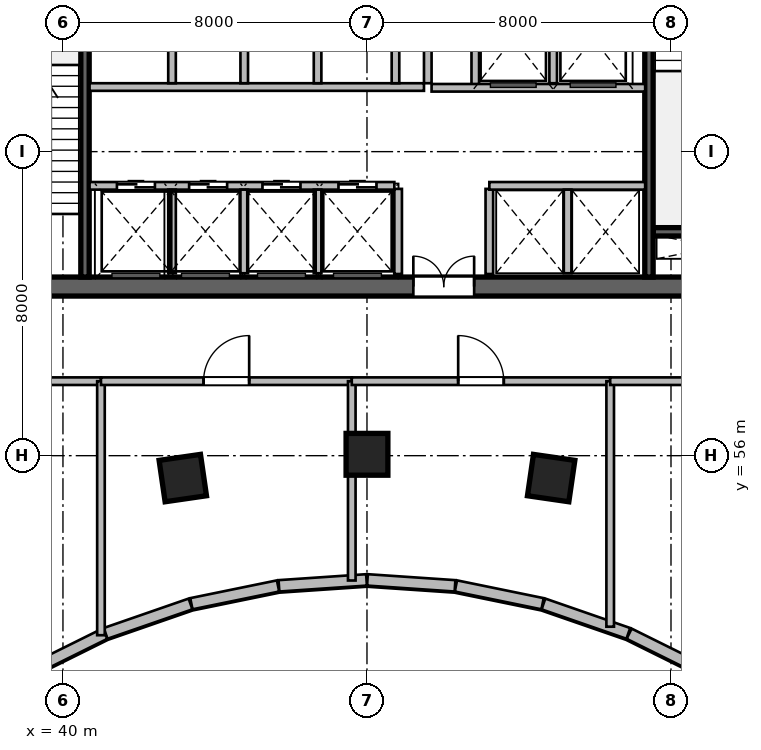
"""IFC4 building model, lengths in metres.
Left out: names, types, materials, properties, quantities, classifications, styles, units other than length and angle.
Written with IfcOpenShell. Run it as: python <this file> out.ifc"""

import sys

from ifc_helpers import new_model, si_unit, direction, frame, frame_2d, origin, origin_2d, place, context, subcontext, project, spatial, rectangle, extrude, source, transform, mapped, element, fill, save


model = new_model("IFC4")
c1 = context("Model", 3, precision=1e-05, world=origin(), true_north=direction((0.0, 1.0)))
c2 = subcontext(c1, "Body", "Model", "MODEL_VIEW")
j1 = project(units=[si_unit("LENGTHUNIT", "METRE"), si_unit("PLANEANGLEUNIT", "RADIAN")], contexts=[c1])
p1 = place(None, origin())
s1 = spatial("IfcSite", under=j1, at=p1, CompositionType="ELEMENT")
p2 = place(p1, origin())
s2 = spatial("IfcBuilding", under=s1, at=p2, CompositionType="ELEMENT")
p3 = place(p2, frame((0.0, 0.0, 85.8)))
s3 = spatial("IfcBuildingStorey", under=s2, at=p3, CompositionType="ELEMENT", Elevation=85.8)
m1 = source(origin(), c2, "Body", "SweptSolid", [
    extrude(rectangle(XDim=21.6, YDim=0.5, at=frame_2d((10.8, 0.0))), origin(), (0.0, 0.0, 1.0), 5.4),
])
p4 = place(p3, frame((37.2, 60.45, 0.0), z_axis=(0.0, 0.0, 1.0), x_axis=(1.0, 0.0, 0.0)))
e1 = element("IfcWall", 1, at=p4, inside=s3, PredefinedType="SHEAR", context=c2, shape_type="MappedRepresentation", body=[
    mapped(m1, transform((0.0, 0.0, 0.0), scale=1.0)),
])
p5 = place(p4, frame((1.1, 0.0, 0.0)))
e2 = element("IfcOpeningElement", 2, at=p5, cuts=e1, PredefinedType="OPENING", context=c2, shape_type="SweptSolid", body=[
    extrude(rectangle(XDim=1.15, YDim=2.15, at=frame_2d((0.575, 1.075))), frame((0.0, 0.26, 0.0), z_axis=(0.0, -1.0, 0.0), x_axis=(1.0, 0.0, 0.0)), (0.0, 0.0, 1.0), 0.52),
])
p6 = place(p4, frame((19.5, 0.0, 0.0)))
e3 = element("IfcOpeningElement", 3, at=p6, cuts=e1, PredefinedType="OPENING", context=c2, shape_type="SweptSolid", body=[
    extrude(rectangle(XDim=0.9, YDim=2.1, at=frame_2d((0.45, 1.05))), frame((0.0, 0.26, 0.0), z_axis=(0.0, -1.0, 0.0), x_axis=(1.0, 0.0, 0.0)), (0.0, 0.0, 1.0), 0.52),
])
p7 = place(p4, frame((12.02, 0.0, 0.0)))
e4 = element("IfcOpeningElement", 4, at=p7, cuts=e1, PredefinedType="OPENING", context=c2, shape_type="SweptSolid", body=[
    extrude(rectangle(XDim=1.6, YDim=2.15, at=frame_2d((0.8, 1.075))), frame((0.0, 0.26, 0.0), z_axis=(0.0, -1.0, 0.0), x_axis=(1.0, 0.0, 0.0)), (0.0, 0.0, 1.0), 0.52),
])
m2 = source(origin(), c2, "Body", "SweptSolid", [
    extrude(rectangle(XDim=3.27, YDim=0.22, at=frame_2d((1.635, 0.0))), origin(), (0.0, 0.0, 1.0), 5.4),
])
p8 = place(p3, frame((55.53, 61.89, 0.0), z_axis=(0.0, 0.0, 1.0), x_axis=(1.0, 0.0, 0.0)))
e5 = element("IfcWall", 5, at=p8, inside=s3, PredefinedType="SHEAR", context=c2, shape_type="MappedRepresentation", body=[
    mapped(m2, transform((0.0, 0.0, 0.0), scale=1.0)),
])
m3 = source(origin(), c2, "Body", "SweptSolid", [
    extrude(rectangle(XDim=11.0, YDim=0.22, at=frame_2d((5.5, 0.0))), origin(), (0.0, 0.0, 1.0), 5.4),
])
p9 = place(p3, frame((40.58, 60.7, 0.0), z_axis=(0.0, 0.0, 1.0), x_axis=(0.0, 1.0, 0.0)))
e6 = element("IfcWall", 6, at=p9, inside=s3, PredefinedType="SHEAR", context=c2, shape_type="MappedRepresentation", body=[
    mapped(m3, transform((0.0, 0.0, 0.0), scale=1.0)),
])
p10 = place(p3, frame((55.42, 60.7, 0.0), z_axis=(0.0, 0.0, 1.0), x_axis=(0.0, 1.0, 0.0)))
e7 = element("IfcWall", 7, at=p10, inside=s3, PredefinedType="SHEAR", context=c2, shape_type="MappedRepresentation", body=[
    mapped(m3, transform((0.0, 0.0, 0.0), scale=1.0)),
])
p11 = place(p10, frame((9.545, 0.0, 0.0)))
e8 = element("IfcOpeningElement", 8, at=p11, cuts=e7, PredefinedType="OPENING", context=c2, shape_type="SweptSolid", body=[
    extrude(rectangle(XDim=1.15, YDim=2.15, at=frame_2d((0.575, 1.075))), frame((0.0, 0.12, 0.0), z_axis=(0.0, -1.0, 0.0), x_axis=(1.0, 0.0, 0.0)), (0.0, 0.0, 1.0), 0.24),
])
m4 = source(origin(), c2, "Body", "SweptSolid", [
    extrude(rectangle(XDim=1.1, YDim=1.1, at=origin_2d()), origin(), (0.0, 0.0, 1.0), 5.4),
])
for number, where, z_axis, x_axis in (
    (9, (43.154, 55.411, 0.0), (0.0, 0.0, 1.0), (-0.143, 0.99, 0.0)),
    (10, (48.0, 56.036, 0.0), (0.0, 0.0, 1.0), (0.0, 1.0, 0.0)),
    (11, (52.846, 55.411, 0.0), (0.0, 0.0, 1.0), (0.143, 0.99, 0.0)),
):
    element("IfcColumn", number, at=place(p3, frame(where, z_axis=z_axis, x_axis=x_axis)), inside=s3, PredefinedType="COLUMN", context=c2, shape_type="MappedRepresentation", body=[
        mapped(m4, transform((0.0, 0.0, 0.0), scale=1.0)),
    ])
m5 = source(origin(), c2, "Body", "SweptSolid", [
    extrude(rectangle(XDim=2.415, YDim=0.3, at=frame_2d((1.208, 0.0))), origin(), (0.0, 0.0, 1.0), 5.15),
])
p12 = place(p3, frame((57.062, 50.243, 0.0), z_axis=(0.0, 0.0, 1.0), x_axis=(-0.895978588606, 0.444097251466, 0.0)))
e12 = element("IfcWall", 12, at=p12, inside=s3, PredefinedType="SOLIDWALL", context=c2, shape_type="MappedRepresentation", body=[
    mapped(m5, transform((0.0, 0.0, 0.0), scale=1.0)),
])
m6 = source(origin(), c2, "Body", "SweptSolid", [
    extrude(rectangle(XDim=2.364, YDim=0.3, at=frame_2d((1.182, 0.0))), origin(), (0.0, 0.0, 1.0), 5.15),
])
p13 = place(p3, frame((54.877, 51.324, 0.0), z_axis=(0.0, 0.0, 1.0), x_axis=(-0.944877958415, 0.327422729359, 0.0)))
e13 = element("IfcWall", 13, at=p13, inside=s3, PredefinedType="SOLIDWALL", context=c2, shape_type="MappedRepresentation", body=[
    mapped(m6, transform((0.0, 0.0, 0.0), scale=1.0)),
])
m7 = source(origin(), c2, "Body", "SweptSolid", [
    extrude(rectangle(XDim=2.328, YDim=0.3, at=frame_2d((1.164, 0.0))), origin(), (0.0, 0.0, 1.0), 5.15),
])
p14 = place(p3, frame((52.621, 52.104, 0.0), z_axis=(0.0, 0.0, 1.0), x_axis=(-0.979604817867, 0.200933821971, 0.0)))
e14 = element("IfcWall", 14, at=p14, inside=s3, PredefinedType="SOLIDWALL", context=c2, shape_type="MappedRepresentation", body=[
    mapped(m7, transform((0.0, 0.0, 0.0), scale=1.0)),
])
m8 = source(origin(), c2, "Body", "SweptSolid", [
    extrude(rectangle(XDim=2.31, YDim=0.3, at=frame_2d((1.155, 0.0))), origin(), (0.0, 0.0, 1.0), 5.15),
])
for number, where, z_axis, x_axis in (
    (15, (50.316, 52.575, 0.0), (0.0, 0.0, 1.0), (-0.998, 0.068, 0.0)),
    (16, (47.988, 52.732, 0.0), (0.0, 0.0, 1.0), (-0.998, -0.068, 0.0)),
):
    element("IfcWall", number, at=place(p3, frame(where, z_axis=z_axis, x_axis=x_axis)), inside=s3, PredefinedType="SOLIDWALL", context=c2, shape_type="MappedRepresentation", body=[
        mapped(m8, transform((0.0, 0.0, 0.0), scale=1.0)),
    ])
p15 = place(p3, frame((45.66, 52.572, 0.0), z_axis=(0.0, 0.0, 1.0), x_axis=(-0.979604817867, -0.200933821971, 0.0)))
e17 = element("IfcWall", 17, at=p15, inside=s3, PredefinedType="SOLIDWALL", context=c2, shape_type="MappedRepresentation", body=[
    mapped(m7, transform((0.0, 0.0, 0.0), scale=1.0)),
])
p16 = place(p3, frame((43.356, 52.098, 0.0), z_axis=(0.0, 0.0, 1.0), x_axis=(-0.944877958415, -0.327422729359, 0.0)))
e18 = element("IfcWall", 18, at=p16, inside=s3, PredefinedType="SOLIDWALL", context=c2, shape_type="MappedRepresentation", body=[
    mapped(m6, transform((0.0, 0.0, 0.0), scale=1.0)),
])
p17 = place(p3, frame((41.102, 51.315, 0.0), z_axis=(0.0, 0.0, 1.0), x_axis=(-0.895978588606, -0.444097251466, 0.0)))
e19 = element("IfcWall", 19, at=p17, inside=s3, PredefinedType="SOLIDWALL", context=c2, shape_type="MappedRepresentation", body=[
    mapped(m5, transform((0.0, 0.0, 0.0), scale=1.0)),
])
m9 = source(origin(), c2, "Body", "SweptSolid", [
    extrude(rectangle(XDim=2.24, YDim=0.2, at=frame_2d((1.12, 0.0))), origin(), (0.0, 0.0, 1.0), 5.15),
])
for number, where, z_axis, x_axis in (
    (20, (48.82, 60.78, 0.0), (0.0, 0.0, 1.0), (0.0, 1.0, 0.0)),
    (21, (51.22, 60.78, 0.0), (0.0, 0.0, 1.0), (0.0, 1.0, 0.0)),
):
    element("IfcWall", number, at=place(p3, frame(where, z_axis=z_axis, x_axis=x_axis)), inside=s3, PredefinedType="SOLIDWALL", context=c2, shape_type="MappedRepresentation", body=[
        mapped(m9, transform((0.0, 0.0, 0.0), scale=1.0)),
    ])
m10 = source(origin(), c2, "Body", "SweptSolid", [
    extrude(rectangle(XDim=5.8, YDim=0.2, at=frame_2d((2.9, 0.0))), origin(), (0.0, 0.0, 1.0), 5.15),
])
p18 = place(p3, frame((49.6, 65.8, 0.0), z_axis=(0.0, 0.0, 1.0), x_axis=(0.0, 1.0, 0.0)))
e22 = element("IfcWall", 22, at=p18, inside=s3, PredefinedType="SOLIDWALL", context=c2, shape_type="MappedRepresentation", body=[
    mapped(m10, transform((0.0, 0.0, 0.0), scale=1.0)),
])
m11 = source(origin(), c2, "Body", "SweptSolid", [
    extrude(rectangle(XDim=2.58, YDim=0.2, at=frame_2d((1.29, 0.0))), origin(), (0.0, 0.0, 1.0), 5.15),
])
p19 = place(p3, frame((50.85, 65.68, 0.0), z_axis=(0.0, 0.0, 1.0), x_axis=(0.0, 1.0, 0.0)))
e23 = element("IfcWall", 23, at=p19, inside=s3, PredefinedType="SOLIDWALL", context=c2, shape_type="MappedRepresentation", body=[
    mapped(m11, transform((0.0, 0.0, 0.0), scale=1.0)),
])
m12 = source(origin(), c2, "Body", "SweptSolid", [
    extrude(rectangle(XDim=2.4, YDim=0.2, at=frame_2d((1.2, 0.0))), origin(), (0.0, 0.0, 1.0), 5.15),
])
p20 = place(p3, frame((52.9, 65.8, 0.0), z_axis=(0.0, 0.0, 1.0), x_axis=(0.0, 1.0, 0.0)))
e24 = element("IfcWall", 24, at=p20, inside=s3, PredefinedType="SOLIDWALL", context=c2, shape_type="MappedRepresentation", body=[
    mapped(m12, transform((0.0, 0.0, 0.0), scale=1.0)),
])
m13 = source(origin(), c2, "Body", "SweptSolid", [
    extrude(rectangle(XDim=5.62, YDim=0.2, at=frame_2d((2.81, 0.0))), origin(), (0.0, 0.0, 1.0), 5.15),
])
p21 = place(p3, frame((49.7, 65.68, 0.0), z_axis=(0.0, 0.0, 1.0), x_axis=(1.0, 0.0, 0.0)))
e25 = element("IfcWall", 25, at=p21, inside=s3, PredefinedType="SOLIDWALL", context=c2, shape_type="MappedRepresentation", body=[
    mapped(m13, transform((0.0, 0.0, 0.0), scale=1.0)),
])
m14 = source(origin(), c2, "Body", "SweptSolid", [
    extrude(rectangle(XDim=8.02, YDim=0.2, at=frame_2d((4.01, 0.0))), origin(), (0.0, 0.0, 1.0), 5.15),
])
p22 = place(p3, frame((40.7, 63.1, 0.0), z_axis=(0.0, 0.0, 1.0), x_axis=(1.0, 0.0, 0.0)))
e26 = element("IfcWall", 26, at=p22, inside=s3, PredefinedType="SOLIDWALL", context=c2, shape_type="MappedRepresentation", body=[
    mapped(m14, transform((0.0, 0.0, 0.0), scale=1.0)),
])
p23 = place(p22, frame((0.72, 0.0, 0.0)))
e27 = element("IfcOpeningElement", 27, at=p23, cuts=e26, PredefinedType="OPENING", context=c2, shape_type="SweptSolid", body=[
    extrude(rectangle(XDim=1.0, YDim=2.15, at=frame_2d((0.5, 1.075))), frame((0.0, 0.11, 0.0), z_axis=(0.0, -1.0, 0.0), x_axis=(1.0, 0.0, 0.0)), (0.0, 0.0, 1.0), 0.22),
])
p24 = place(p22, frame((2.62, 0.0, 0.0)))
e28 = element("IfcOpeningElement", 28, at=p24, cuts=e26, PredefinedType="OPENING", context=c2, shape_type="SweptSolid", body=[
    extrude(rectangle(XDim=1.0, YDim=2.15, at=frame_2d((0.5, 1.075))), frame((0.0, 0.11, 0.0), z_axis=(0.0, -1.0, 0.0), x_axis=(1.0, 0.0, 0.0)), (0.0, 0.0, 1.0), 0.22),
])
p25 = place(p22, frame((4.55, 0.0, 0.0)))
e29 = element("IfcOpeningElement", 29, at=p25, cuts=e26, PredefinedType="OPENING", context=c2, shape_type="SweptSolid", body=[
    extrude(rectangle(XDim=1.0, YDim=2.15, at=frame_2d((0.5, 1.075))), frame((0.0, 0.11, 0.0), z_axis=(0.0, -1.0, 0.0), x_axis=(1.0, 0.0, 0.0)), (0.0, 0.0, 1.0), 0.22),
])
p26 = place(p22, frame((6.55, 0.0, 0.0)))
e30 = element("IfcOpeningElement", 30, at=p26, cuts=e26, PredefinedType="OPENING", context=c2, shape_type="SweptSolid", body=[
    extrude(rectangle(XDim=1.0, YDim=2.15, at=frame_2d((0.5, 1.075))), frame((0.0, 0.11, 0.0), z_axis=(0.0, -1.0, 0.0), x_axis=(1.0, 0.0, 0.0)), (0.0, 0.0, 1.0), 0.22),
])
m15 = source(origin(), c2, "Body", "SweptSolid", [
    extrude(rectangle(XDim=4.1, YDim=0.2, at=frame_2d((2.05, 0.0))), origin(), (0.0, 0.0, 1.0), 5.15),
])
p27 = place(p3, frame((51.22, 63.1, 0.0), z_axis=(0.0, 0.0, 1.0), x_axis=(1.0, 0.0, 0.0)))
e31 = element("IfcWall", 31, at=p27, inside=s3, PredefinedType="SOLIDWALL", context=c2, shape_type="MappedRepresentation", body=[
    mapped(m15, transform((0.0, 0.0, 0.0), scale=1.0)),
])
m16 = source(origin(), c2, "Body", "SweptSolid", [
    extrude(rectangle(XDim=2.2, YDim=0.2, at=frame_2d((1.1, 0.0))), origin(), (0.0, 0.0, 1.0), 5.15),
])
for number, where, z_axis, x_axis in (
    (32, (42.87, 60.8, 0.0), (0.0, 0.0, 1.0), (0.0, 1.0, 0.0)),
    (33, (44.77, 60.8, 0.0), (0.0, 0.0, 1.0), (0.0, 1.0, 0.0)),
    (34, (46.7, 60.8, 0.0), (0.0, 0.0, 1.0), (0.0, 1.0, 0.0)),
    (35, (53.28, 60.8, 0.0), (0.0, 0.0, 1.0), (0.0, 1.0, 0.0)),
):
    element("IfcWall", number, at=place(p3, frame(where, z_axis=z_axis, x_axis=x_axis)), inside=s3, PredefinedType="SOLIDWALL", context=c2, shape_type="MappedRepresentation", body=[
        mapped(m16, transform((0.0, 0.0, 0.0), scale=1.0)),
    ])
m17 = source(origin(), c2, "Body", "SweptSolid", [
    extrude(rectangle(XDim=8.8, YDim=0.2, at=frame_2d((4.4, 0.0))), origin(), (0.0, 0.0, 1.0), 5.15),
])
p28 = place(p3, frame((40.7, 65.7, 0.0), z_axis=(0.0, 0.0, 1.0), x_axis=(1.0, 0.0, 0.0)))
e36 = element("IfcWall", 36, at=p28, inside=s3, PredefinedType="SOLIDWALL", context=c2, shape_type="MappedRepresentation", body=[
    mapped(m17, transform((0.0, 0.0, 0.0), scale=1.0)),
])
for number, where, z_axis, x_axis in (
    (37, (48.75, 65.8, 0.0), (0.0, 0.0, 1.0), (0.0, 1.0, 0.0)),
    (38, (42.87, 65.8, 0.0), (0.0, 0.0, 1.0), (0.0, 1.0, 0.0)),
    (39, (44.77, 65.8, 0.0), (0.0, 0.0, 1.0), (0.0, 1.0, 0.0)),
    (40, (46.7, 65.8, 0.0), (0.0, 0.0, 1.0), (0.0, 1.0, 0.0)),
):
    element("IfcWall", number, at=place(p3, frame(where, z_axis=z_axis, x_axis=x_axis)), inside=s3, PredefinedType="SOLIDWALL", context=c2, shape_type="MappedRepresentation", body=[
        mapped(m12, transform((0.0, 0.0, 0.0), scale=1.0)),
    ])
m18 = source(origin(), c2, "Body", "SweptSolid", [
    extrude(rectangle(XDim=6.55, YDim=0.2, at=frame_2d((3.275, 0.0))), origin(), (0.0, 0.0, 1.0), 5.15),
])
p29 = place(p3, frame((34.45, 57.96, 0.0), z_axis=(0.0, 0.0, 1.0), x_axis=(1.0, 0.0, 0.0)))
e41 = element("IfcWall", 41, at=p29, inside=s3, PredefinedType="SOLIDWALL", context=c2, shape_type="MappedRepresentation", body=[
    mapped(m18, transform((0.0, 0.0, 0.0), scale=1.0)),
])
p30 = place(p29, frame((2.675, 0.0, 0.0)))
e42 = element("IfcOpeningElement", 42, at=p30, cuts=e41, PredefinedType="OPENING", context=c2, shape_type="SweptSolid", body=[
    extrude(rectangle(XDim=1.2, YDim=2.15, at=frame_2d((0.6, 1.075))), frame((0.0, 0.11, 0.0), z_axis=(0.0, -1.0, 0.0), x_axis=(1.0, 0.0, 0.0)), (0.0, 0.0, 1.0), 0.22),
])
m19 = source(origin(), c2, "Body", "SweptSolid", [
    extrude(rectangle(XDim=6.684, YDim=0.2, at=frame_2d((3.342, 0.0))), origin(), (0.0, 0.0, 1.0), 5.15),
])
p31 = place(p3, frame((41.0, 51.276, 0.0), z_axis=(0.0, 0.0, 1.0), x_axis=(0.0, 1.0, 0.0)))
e43 = element("IfcWall", 43, at=p31, inside=s3, PredefinedType="SOLIDWALL", context=c2, shape_type="MappedRepresentation", body=[
    mapped(m19, transform((0.0, 0.0, 0.0), scale=1.0)),
])
m20 = source(origin(), c2, "Body", "SweptSolid", [
    extrude(rectangle(XDim=6.6, YDim=0.2, at=frame_2d((3.3, 0.0))), origin(), (0.0, 0.0, 1.0), 4.717),
])
p32 = place(p3, frame((41.0, 57.96, 0.0), z_axis=(0.0, 0.0, 1.0), x_axis=(1.0, 0.0, 0.0)))
e44 = element("IfcWall", 44, at=p32, inside=s3, PredefinedType="SOLIDWALL", context=c2, shape_type="MappedRepresentation", body=[
    mapped(m20, transform((0.0, 0.0, 0.0), scale=1.0)),
])
p33 = place(p32, frame((2.7, 0.0, 0.0)))
e45 = element("IfcOpeningElement", 45, at=p33, cuts=e44, PredefinedType="OPENING", context=c2, shape_type="SweptSolid", body=[
    extrude(rectangle(XDim=1.2, YDim=2.15, at=frame_2d((0.6, 1.075))), frame((0.0, 0.11, 0.0), z_axis=(0.0, -1.0, 0.0), x_axis=(1.0, 0.0, 0.0)), (0.0, 0.0, 1.0), 0.22),
])
m21 = source(origin(), c2, "Body", "SweptSolid", [
    extrude(rectangle(XDim=5.245, YDim=0.2, at=frame_2d((2.622, 0.0))), origin(), (0.0, 0.0, 1.0), 5.15),
])
p34 = place(p3, frame((47.6, 52.715, 0.0), z_axis=(0.0, 0.0, 1.0), x_axis=(0.0, 1.0, 0.0)))
e46 = element("IfcWall", 46, at=p34, inside=s3, PredefinedType="SOLIDWALL", context=c2, shape_type="MappedRepresentation", body=[
    mapped(m21, transform((0.0, 0.0, 0.0), scale=1.0)),
])
m22 = source(origin(), c2, "Body", "SweptSolid", [
    extrude(rectangle(XDim=6.8, YDim=0.2, at=frame_2d((3.4, 0.0))), origin(), (0.0, 0.0, 1.0), 4.717),
])
p35 = place(p3, frame((47.6, 57.96, 0.0), z_axis=(0.0, 0.0, 1.0), x_axis=(1.0, 0.0, 0.0)))
e47 = element("IfcWall", 47, at=p35, inside=s3, PredefinedType="SOLIDWALL", context=c2, shape_type="MappedRepresentation", body=[
    mapped(m22, transform((0.0, 0.0, 0.0), scale=1.0)),
])
p36 = place(p35, frame((2.8, 0.0, 0.0)))
e48 = element("IfcOpeningElement", 48, at=p36, cuts=e47, PredefinedType="OPENING", context=c2, shape_type="SweptSolid", body=[
    extrude(rectangle(XDim=1.2, YDim=2.15, at=frame_2d((0.6, 1.075))), frame((0.0, 0.11, 0.0), z_axis=(0.0, -1.0, 0.0), x_axis=(1.0, 0.0, 0.0)), (0.0, 0.0, 1.0), 0.22),
])
m23 = source(origin(), c2, "Body", "SweptSolid", [
    extrude(rectangle(XDim=6.46, YDim=0.2, at=frame_2d((3.23, 0.0))), origin(), (0.0, 0.0, 1.0), 5.15),
])
p37 = place(p3, frame((54.4, 51.5, 0.0), z_axis=(0.0, 0.0, 1.0), x_axis=(0.0, 1.0, 0.0)))
e49 = element("IfcWall", 49, at=p37, inside=s3, PredefinedType="SOLIDWALL", context=c2, shape_type="MappedRepresentation", body=[
    mapped(m23, transform((0.0, 0.0, 0.0), scale=1.0)),
])
m24 = source(origin(), c2, "Body", "SweptSolid", [
    extrude(rectangle(XDim=7.15, YDim=0.2, at=frame_2d((3.575, 0.0))), origin(), (0.0, 0.0, 1.0), 4.717),
])
p38 = place(p3, frame((54.4, 57.96, 0.0), z_axis=(0.0, 0.0, 1.0), x_axis=(1.0, 0.0, 0.0)))
e50 = element("IfcWall", 50, at=p38, inside=s3, PredefinedType="SOLIDWALL", context=c2, shape_type="MappedRepresentation", body=[
    mapped(m24, transform((0.0, 0.0, 0.0), scale=1.0)),
])
p39 = place(p38, frame((2.975, 0.0, 0.0)))
e51 = element("IfcOpeningElement", 51, at=p39, cuts=e50, PredefinedType="OPENING", context=c2, shape_type="SweptSolid", body=[
    extrude(rectangle(XDim=1.2, YDim=2.15, at=frame_2d((0.6, 1.075))), frame((0.0, 0.11, 0.0), z_axis=(0.0, -1.0, 0.0), x_axis=(1.0, 0.0, 0.0)), (0.0, 0.0, 1.0), 0.22),
])
m25 = source(origin(), c2, "Body", "SweptSolid", [
    extrude(rectangle(XDim=1.6, YDim=2.15, at=frame_2d((0.8, 1.075))), frame((0.0, 0.025, 0.0), z_axis=(0.0, -1.0, 0.0), x_axis=(1.0, 0.0, 0.0)), (0.0, 0.0, 1.0), 0.05),
])
p40 = place(p7, origin())
e52 = element("IfcDoor", 52, at=p40, inside=s3, OperationType="DOUBLE_DOOR_SINGLE_SWING", PredefinedType="DOOR", context=c2, shape_type="MappedRepresentation", body=[
    mapped(m25, transform((0.0, 0.0, 0.0), scale=1.0)),
])
fill(e4, e52)
m26 = source(origin(), c2, "Body", "SweptSolid", [
    extrude(rectangle(XDim=1.0, YDim=2.15, at=frame_2d((0.5, 1.075))), frame((0.0, 0.025, 0.0), z_axis=(0.0, -1.0, 0.0), x_axis=(1.0, 0.0, 0.0)), (0.0, 0.0, 1.0), 0.05),
])
p41 = place(p23, origin())
e53 = element("IfcDoor", 53, at=p41, inside=s3, OperationType="DOUBLE_DOOR_SLIDING", PredefinedType="DOOR", context=c2, shape_type="MappedRepresentation", body=[
    mapped(m26, transform((0.0, 0.0, 0.0), scale=1.0)),
])
fill(e27, e53)
p42 = place(p24, origin())
e54 = element("IfcDoor", 54, at=p42, inside=s3, OperationType="DOUBLE_DOOR_SLIDING", PredefinedType="DOOR", context=c2, shape_type="MappedRepresentation", body=[
    mapped(m26, transform((0.0, 0.0, 0.0), scale=1.0)),
])
fill(e28, e54)
p43 = place(p25, origin())
e55 = element("IfcDoor", 55, at=p43, inside=s3, OperationType="DOUBLE_DOOR_SLIDING", PredefinedType="DOOR", context=c2, shape_type="MappedRepresentation", body=[
    mapped(m26, transform((0.0, 0.0, 0.0), scale=1.0)),
])
fill(e29, e55)
p44 = place(p26, origin())
e56 = element("IfcDoor", 56, at=p44, inside=s3, OperationType="DOUBLE_DOOR_SLIDING", PredefinedType="DOOR", context=c2, shape_type="MappedRepresentation", body=[
    mapped(m26, transform((0.0, 0.0, 0.0), scale=1.0)),
])
fill(e30, e56)
m27 = source(origin(), c2, "Body", "SweptSolid", [
    extrude(rectangle(XDim=1.2, YDim=2.15, at=frame_2d((0.6, 1.075))), frame((0.0, 0.025, 0.0), z_axis=(0.0, -1.0, 0.0), x_axis=(1.0, 0.0, 0.0)), (0.0, 0.0, 1.0), 0.05),
])
p45 = place(p33, origin())
e57 = element("IfcDoor", 57, at=p45, inside=s3, OperationType="SINGLE_SWING_RIGHT", PredefinedType="DOOR", context=c2, shape_type="MappedRepresentation", body=[
    mapped(m27, transform((0.0, 0.0, 0.0), scale=1.0)),
])
fill(e45, e57)
p46 = place(p36, origin())
e58 = element("IfcDoor", 58, at=p46, inside=s3, OperationType="SINGLE_SWING_LEFT", PredefinedType="DOOR", context=c2, shape_type="MappedRepresentation", body=[
    mapped(m27, transform((0.0, 0.0, 0.0), scale=1.0)),
])
fill(e48, e58)
save(model, sys.argv[1])
